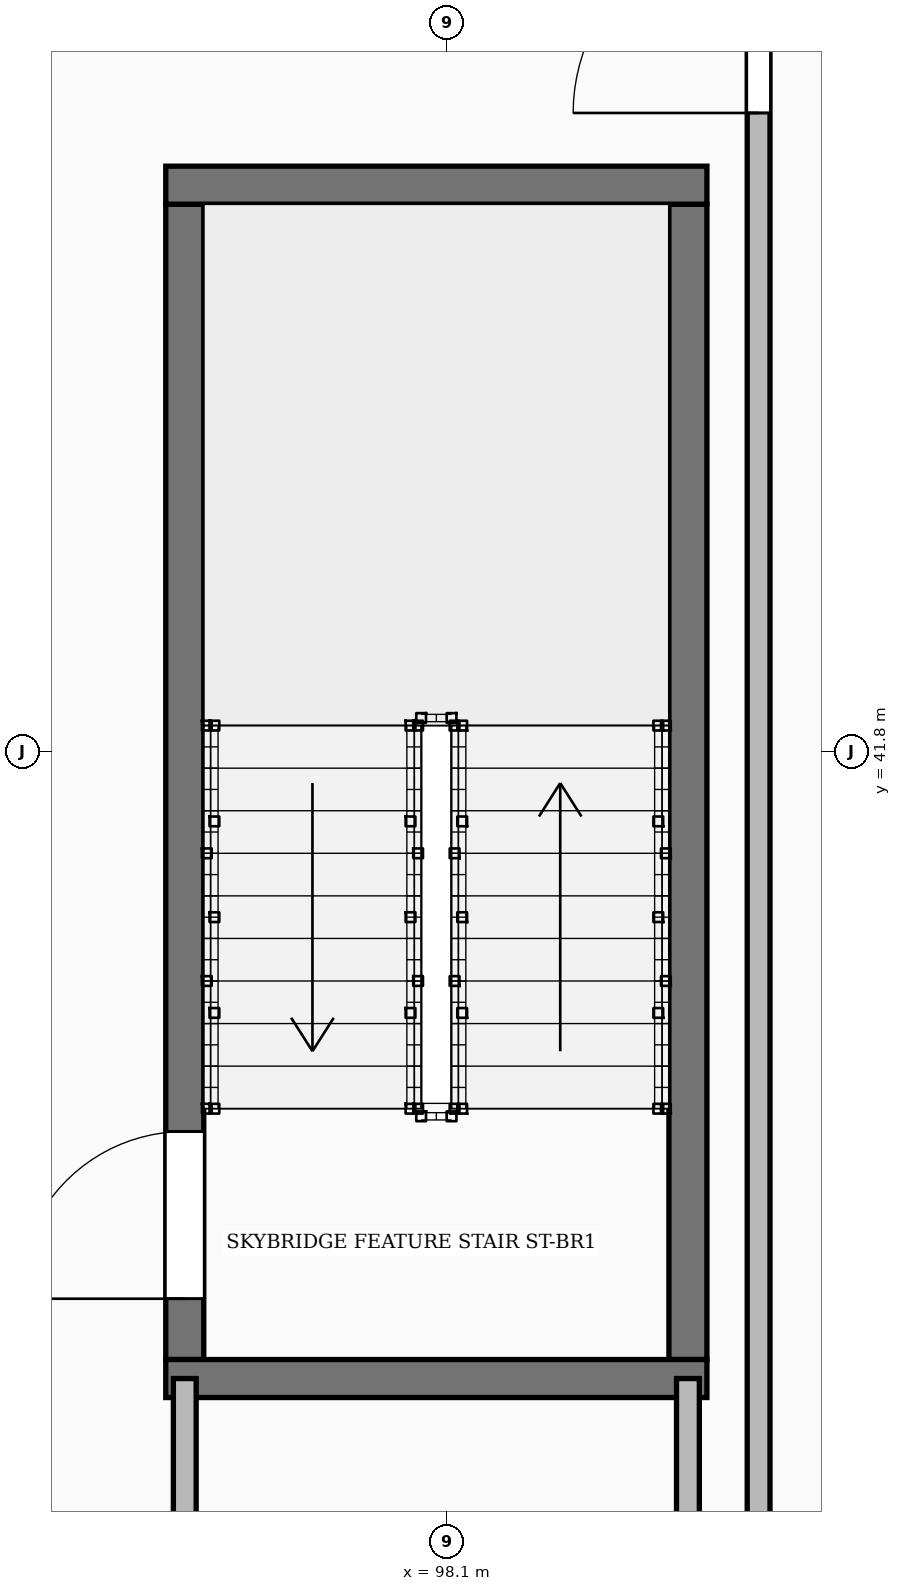
"""IFC4 building model, lengths in metres.
Left out: names, types, materials, properties, quantities, classifications, styles, units other than length and angle.
Written with IfcOpenShell. Run it as: python <this file> out.ifc"""

import sys

from ifc_helpers import new_model, si_unit, direction, frame, frame_2d, origin, place, context, subcontext, project, spatial, rectangle, extrude, element, fill, save


model = new_model("IFC4")
c1 = context("Model", 3, precision=1e-05, world=origin(), true_north=direction((0.0, 1.0)))
c2 = subcontext(c1, "Body", "Model", "MODEL_VIEW")
j1 = project(units=[si_unit("LENGTHUNIT", "METRE"), si_unit("PLANEANGLEUNIT", "RADIAN")], contexts=[c1])
p1 = place(None, origin())
s1 = spatial("IfcSite", under=j1, at=p1, CompositionType="ELEMENT")
p2 = place(p1, origin())
s2 = spatial("IfcBuilding", under=s1, at=p2, CompositionType="ELEMENT")
p3 = place(p2, frame((0.0, 0.0, 150.1)))
s3 = spatial("IfcBuildingStorey", under=s2, at=p3, CompositionType="ELEMENT", Elevation=150.1)
p4 = place(p3, frame((96.375, 37.8, 0.0), z_axis=(0.0, 0.0, 1.0), x_axis=(0.0, 1.0, 0.0)))
e1 = element("IfcWall", 1, at=p4, inside=s3, PredefinedType="SHEAR", context=c2, shape_type="SweptSolid", body=[
    extrude(rectangle(XDim=7.6, YDim=0.25, at=frame_2d((3.8, 0.0))), origin(), (0.0, 0.0, 1.0), 3.6),
])
p5 = place(p4, frame((0.4, 0.0, 0.0)))
e2 = element("IfcOpeningElement", 2, at=p5, cuts=e1, PredefinedType="OPENING", context=c2, shape_type="SweptSolid", body=[
    extrude(rectangle(XDim=1.1, YDim=2.1, at=frame_2d((0.55, 1.05))), frame((0.0, 0.135, 0.0), z_axis=(0.0, -1.0, 0.0), x_axis=(1.0, 0.0, 0.0)), (0.0, 0.0, 1.0), 0.27),
])
p6 = place(p3, frame((99.685, 37.8, 0.0), z_axis=(0.0, 0.0, 1.0), x_axis=(0.0, 1.0, 0.0)))
e3 = element("IfcWall", 3, at=p6, inside=s3, PredefinedType="SHEAR", context=c2, shape_type="SweptSolid", body=[
    extrude(rectangle(XDim=7.6, YDim=0.25, at=frame_2d((3.8, 0.0))), origin(), (0.0, 0.0, 1.0), 3.6),
])
for number, where, z_axis, x_axis in (
    (4, (96.25, 37.675, 0.0), (0.0, 0.0, 1.0), (1.0, 0.0, 0.0)),
    (5, (96.25, 45.525, 0.0), (0.0, 0.0, 1.0), (1.0, 0.0, 0.0)),
):
    element("IfcWall", number, at=place(p3, frame(where, z_axis=z_axis, x_axis=x_axis)), inside=s3, PredefinedType="SHEAR", context=c2, shape_type="SweptSolid", body=[
        extrude(rectangle(XDim=3.56, YDim=0.25, at=frame_2d((1.78, 0.0))), origin(), (0.0, 0.0, 1.0), 3.6),
    ])
p7 = place(p3, frame((96.375, 32.95, 0.0), z_axis=(0.0, 0.0, 1.0), x_axis=(0.0, 1.0, 0.0)))
e6 = element("IfcWall", 6, at=p7, inside=s3, PredefinedType="PARTITIONING", context=c2, shape_type="SweptSolid", body=[
    extrude(rectangle(XDim=4.725, YDim=0.15, at=frame_2d((2.363, 0.0))), origin(), (0.0, 0.0, 1.0), 2.389),
])
p8 = place(p7, frame((1.6, 0.0, 0.0)))
e7 = element("IfcOpeningElement", 7, at=p8, cuts=e6, PredefinedType="OPENING", context=c2, shape_type="SweptSolid", body=[
    extrude(rectangle(XDim=0.96, YDim=2.1, at=frame_2d((0.48, 1.05))), frame((0.0, 0.085, 0.0), z_axis=(0.0, -1.0, 0.0), x_axis=(1.0, 0.0, 0.0)), (0.0, 0.0, 1.0), 0.17),
])
p9 = place(p3, frame((99.685, 32.95, 0.0), z_axis=(0.0, 0.0, 1.0), x_axis=(0.0, 1.0, 0.0)))
e8 = element("IfcWall", 8, at=p9, inside=s3, PredefinedType="PARTITIONING", context=c2, shape_type="SweptSolid", body=[
    extrude(rectangle(XDim=4.725, YDim=0.15, at=frame_2d((2.363, 0.0))), origin(), (0.0, 0.0, 1.0), 2.389),
])
p10 = place(p3, frame((100.15, 32.9, 0.0), z_axis=(0.0, 0.0, 1.0), x_axis=(0.0, 1.0, 0.0)))
e9 = element("IfcWall", 9, at=p10, inside=s3, PredefinedType="PARTITIONING", context=c2, shape_type="SweptSolid", body=[
    extrude(rectangle(XDim=17.8, YDim=0.15, at=frame_2d((8.9, 0.0))), origin(), (0.0, 0.0, 1.0), 3.31),
])
p11 = place(p10, frame((13.1, 0.0, 0.0)))
e10 = element("IfcOpeningElement", 10, at=p11, cuts=e9, PredefinedType="OPENING", context=c2, shape_type="SweptSolid", body=[
    extrude(rectangle(XDim=1.22, YDim=2.18, at=frame_2d((0.61, 1.09))), frame((0.0, 0.085, 0.0), z_axis=(0.0, -1.0, 0.0), x_axis=(1.0, 0.0, 0.0)), (0.0, 0.0, 1.0), 0.17),
])
p12 = place(p5, origin())
e11 = element("IfcDoor", 11, at=p12, inside=s3, OperationType="SINGLE_SWING_LEFT", PredefinedType="DOOR", context=c2, shape_type="SweptSolid", body=[
    extrude(rectangle(XDim=1.1, YDim=2.1, at=frame_2d((0.55, 1.05))), frame((0.0, 0.025, 0.0), z_axis=(0.0, -1.0, 0.0), x_axis=(1.0, 0.0, 0.0)), (0.0, 0.0, 1.0), 0.05),
])
fill(e2, e11)
p13 = place(p11, origin())
e12 = element("IfcDoor", 12, at=p13, inside=s3, OperationType="SINGLE_SWING_LEFT", PredefinedType="DOOR", context=c2, shape_type="SweptSolid", body=[
    extrude(rectangle(XDim=1.22, YDim=2.18, at=frame_2d((0.61, 1.09))), frame((0.0, 0.025, 0.0), z_axis=(0.0, -1.0, 0.0), x_axis=(1.0, 0.0, 0.0)), (0.0, 0.0, 1.0), 0.05),
])
fill(e10, e12)
save(model, sys.argv[1])
